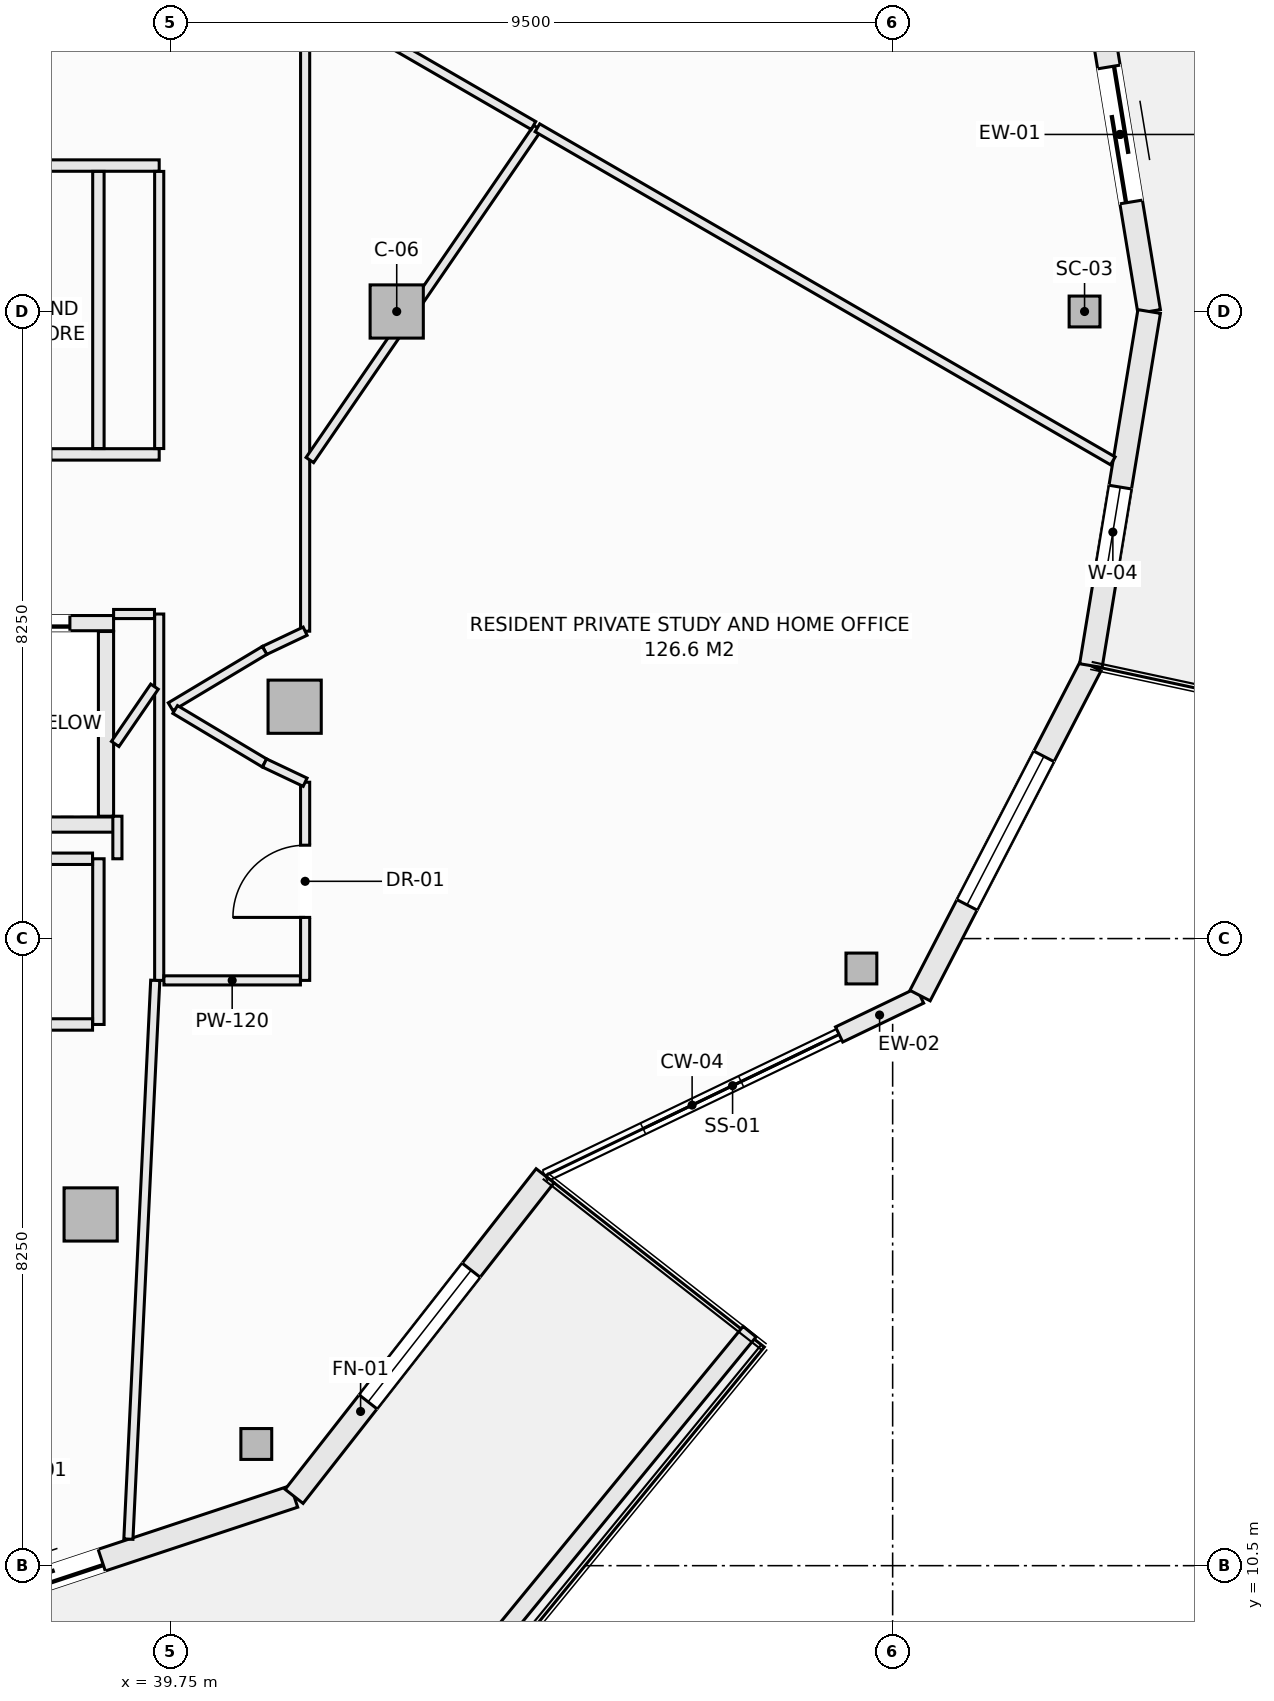
"""IFC4 building model, lengths in metres.
Left out: names, types, materials, properties, quantities, classifications, styles, units other than length and angle.
Written with IfcOpenShell. Run it as: python <this file> out.ifc"""

import sys

from ifc_helpers import new_model, si_unit, direction, frame, frame_2d, origin, origin_2d, place, context, subcontext, project, spatial, rectangle, hollow_rectangle, extrude, element, fill, save


model = new_model("IFC4")
c1 = context("Model", 3, precision=1e-05, world=origin(), true_north=direction((0.0, 1.0)))
c2 = subcontext(c1, "Body", "Model", "MODEL_VIEW")
j1 = project(units=[si_unit("LENGTHUNIT", "METRE"), si_unit("PLANEANGLEUNIT", "RADIAN")], contexts=[c1])
p1 = place(None, origin())
s1 = spatial("IfcSite", under=j1, at=p1, CompositionType="ELEMENT")
p2 = place(p1, origin())
s2 = spatial("IfcBuilding", under=s1, at=p2, CompositionType="ELEMENT")
p3 = place(p2, frame((0.0, 0.0, 239.3)))
s3 = spatial("IfcBuildingStorey", under=s2, at=p3, CompositionType="ELEMENT", Elevation=239.3)
for number, where, z_axis, x_axis in (
    (1, (51.775, 27.0, -0.27), (0.0, 0.0, 1.0), (1.0, 0.0, 0.0)),
    (2, (40.878, 12.101, -0.27), (0.0, 0.0, 1.0), (1.0, 0.0, 0.0)),
    (3, (48.839, 18.356, -0.27), (0.0, 0.0, 1.0), (1.0, 0.0, 0.0)),
):
    element("IfcColumn", number, at=place(p3, frame(where, z_axis=z_axis, x_axis=x_axis)), inside=s3, PredefinedType="COLUMN", context=c2, shape_type="SweptSolid", body=[
        extrude(hollow_rectangle(XDim=0.406, YDim=0.406, WallThickness=0.016, at=origin_2d()), origin(), (0.0, 0.0, 1.0), 3.3),
    ])
for number, where, z_axis, x_axis in (
    (4, (42.725, 27.0, -0.27), (0.0, 0.0, 1.0), (1.0, 0.0, 0.0)),
    (5, (38.698, 15.121, -0.27), (0.0, 0.0, 1.0), (1.0, 0.0, 0.0)),
    (6, (41.382, 21.801, -0.27), (0.0, 0.0, 1.0), (1.0, 0.0, 0.0)),
):
    element("IfcColumn", number, at=place(p3, frame(where, z_axis=z_axis, x_axis=x_axis)), inside=s3, PredefinedType="COLUMN", context=c2, shape_type="SweptSolid", body=[
        extrude(rectangle(XDim=0.7, YDim=0.7, at=origin_2d()), origin(), (0.0, 0.0, 1.0), 3.3),
    ])
p4 = place(p3, frame((51.858, 31.659, 0.0), z_axis=(0.0, 0.0, 1.0), x_axis=(0.162369371657, -0.986730047758, 0.0)))
e7 = element("IfcWall", 7, at=p4, inside=s3, PredefinedType="SOLIDWALL", context=c2, shape_type="SweptSolid", body=[
    extrude(rectangle(XDim=4.721, YDim=0.3, at=frame_2d((2.361, 0.0))), origin(), (0.0, 0.0, 1.0), 2.605),
])
p5 = place(p4, frame((1.461, 0.0, 0.0)))
e8 = element("IfcOpeningElement", 8, at=p5, cuts=e7, PredefinedType="OPENING", context=c2, shape_type="SweptSolid", body=[
    extrude(rectangle(XDim=1.8, YDim=2.25, at=frame_2d((0.9, 1.125))), frame((0.0, 0.16, 0.0), z_axis=(0.0, -1.0, 0.0), x_axis=(1.0, 0.0, 0.0)), (0.0, 0.0, 1.0), 0.32),
])
p6 = place(p3, frame((35.948, 9.613, 0.0), z_axis=(0.0, 0.0, 1.0), x_axis=(0.949232769585, 0.314574552605, 0.0)))
e9 = element("IfcWall", 9, at=p6, inside=s3, PredefinedType="SOLIDWALL", context=c2, shape_type="SweptSolid", body=[
    extrude(rectangle(XDim=5.717, YDim=0.3, at=frame_2d((2.858, 0.0))), origin(), (0.0, 0.0, 1.0), 2.605),
])
p7 = place(p6, frame((1.25, 0.0, 0.0)))
e10 = element("IfcOpeningElement", 10, at=p7, cuts=e9, PredefinedType="OPENING", context=c2, shape_type="SweptSolid", body=[
    extrude(rectangle(XDim=1.8, YDim=2.25, at=frame_2d((0.9, 1.125))), frame((0.0, 0.16, 0.0), z_axis=(0.0, -1.0, 0.0), x_axis=(1.0, 0.0, 0.0)), (0.0, 0.0, 1.0), 0.32),
])
p8 = place(p3, frame((41.375, 11.412, 0.0), z_axis=(0.0, 0.0, 1.0), x_axis=(0.61644588519, 0.787397276241, 0.0)))
e11 = element("IfcWall", 11, at=p8, inside=s3, PredefinedType="SOLIDWALL", context=c2, shape_type="SweptSolid", body=[
    extrude(rectangle(XDim=5.357, YDim=0.3, at=frame_2d((2.678, 0.0))), origin(), (0.0, 0.0, 1.0), 2.605),
])
p9 = place(p8, frame((1.579, 0.0, 0.72)))
e12 = element("IfcOpeningElement", 12, at=p9, cuts=e11, PredefinedType="OPENING", context=c2, shape_type="SweptSolid", body=[
    extrude(rectangle(XDim=2.2, YDim=1.65, at=frame_2d((1.1, 0.825))), frame((0.0, 0.16, 0.0), z_axis=(0.0, -1.0, 0.0), x_axis=(1.0, 0.0, 0.0)), (0.0, 0.0, 1.0), 0.32),
])
p10 = place(p3, frame((48.546, 17.489, 0.0), z_axis=(0.0, 0.0, 1.0), x_axis=(0.901384320487, 0.433019984274, 0.0)))
e13 = element("IfcWall", 13, at=p10, inside=s3, PredefinedType="SOLIDWALL", context=c2, shape_type="SweptSolid", body=[
    extrude(rectangle(XDim=1.181, YDim=0.22, at=frame_2d((0.591, 0.0))), origin(), (0.0, 0.0, 1.0), 2.605),
])
p11 = place(p3, frame((49.611, 18.0, 0.0), z_axis=(0.0, 0.0, 1.0), x_axis=(0.459793771602, 0.888025724625, 0.0)))
e14 = element("IfcWall", 14, at=p11, inside=s3, PredefinedType="SOLIDWALL", context=c2, shape_type="SweptSolid", body=[
    extrude(rectangle(XDim=4.889, YDim=0.3, at=frame_2d((2.444, 0.0))), origin(), (0.0, 0.0, 1.0), 2.605),
])
p12 = place(p11, frame((1.344, 0.0, 0.72)))
e15 = element("IfcOpeningElement", 15, at=p12, cuts=e14, PredefinedType="OPENING", context=c2, shape_type="SweptSolid", body=[
    extrude(rectangle(XDim=2.2, YDim=1.65, at=frame_2d((1.1, 0.825))), frame((0.0, 0.16, 0.0), z_axis=(0.0, -1.0, 0.0), x_axis=(1.0, 0.0, 0.0)), (0.0, 0.0, 1.0), 0.32),
])
p13 = place(p3, frame((51.858, 22.341, 0.0), z_axis=(0.0, 0.0, 1.0), x_axis=(0.162369371657, 0.986730047758, 0.0)))
e16 = element("IfcWall", 16, at=p13, inside=s3, PredefinedType="SOLIDWALL", context=c2, shape_type="SweptSolid", body=[
    extrude(rectangle(XDim=4.721, YDim=0.3, at=frame_2d((2.361, 0.0))), origin(), (0.0, 0.0, 1.0), 2.605),
])
p14 = place(p13, frame((1.18, 0.0, 0.72)))
e17 = element("IfcOpeningElement", 17, at=p14, cuts=e16, PredefinedType="OPENING", context=c2, shape_type="SweptSolid", body=[
    extrude(rectangle(XDim=1.2, YDim=1.65, at=frame_2d((0.6, 0.825))), frame((0.0, 0.16, 0.0), z_axis=(0.0, -1.0, 0.0), x_axis=(1.0, 0.0, 0.0)), (0.0, 0.0, 1.0), 0.32),
])
p15 = place(p3, frame((43.323, 8.646, 0.0), z_axis=(0.0, 0.0, 1.0), x_axis=(0.63407318032, 0.77327304492, 0.0)))
e18 = element("IfcWall", 18, at=p15, inside=s3, PredefinedType="PARAPET", context=c2, shape_type="SweptSolid", body=[
    extrude(rectangle(XDim=6.379, YDim=0.22, at=frame_2d((3.189, 0.0))), origin(), (0.0, 0.0, 1.0), 0.52),
])
p16 = place(p3, frame((36.75, 22.9, 0.0), z_axis=(0.0, 0.0, 1.0), x_axis=(1.0, 0.0, 0.0)))
e19 = element("IfcWall", 19, at=p16, inside=s3, PredefinedType="SOLIDWALL", context=c2, shape_type="SweptSolid", body=[
    extrude(rectangle(XDim=2.25, YDim=0.2, at=frame_2d((1.125, 0.0))), origin(), (0.0, 0.0, 1.0), 3.03),
])
p17 = place(p16, frame((0.575, 0.0, 0.0)))
e20 = element("IfcOpeningElement", 20, at=p17, cuts=e19, PredefinedType="OPENING", context=c2, shape_type="SweptSolid", body=[
    extrude(rectangle(XDim=1.1, YDim=2.2, at=frame_2d((0.55, 1.1))), frame((0.0, 0.11, 0.0), z_axis=(0.0, -1.0, 0.0), x_axis=(1.0, 0.0, 0.0)), (0.0, 0.0, 1.0), 0.22),
])
p18 = place(p3, frame((36.75, 20.25, 0.0), z_axis=(0.0, 0.0, 1.0), x_axis=(1.0, 0.0, 0.0)))
e21 = element("IfcWall", 21, at=p18, inside=s3, PredefinedType="SOLIDWALL", context=c2, shape_type="SweptSolid", body=[
    extrude(rectangle(XDim=2.25, YDim=0.2, at=frame_2d((1.125, 0.0))), origin(), (0.0, 0.0, 1.0), 3.03),
])
p19 = place(p3, frame((38.9, 20.36, 0.0), z_axis=(0.0, 0.0, 1.0), x_axis=(0.0, 1.0, 0.0)))
e22 = element("IfcWall", 22, at=p19, inside=s3, PredefinedType="SOLIDWALL", context=c2, shape_type="SweptSolid", body=[
    extrude(rectangle(XDim=2.43, YDim=0.2, at=frame_2d((1.215, 0.0))), origin(), (0.0, 0.0, 1.0), 3.03),
])
p20 = place(p3, frame((29.96, 25.12, 0.0), z_axis=(0.0, 0.0, 1.0), x_axis=(1.0, 0.0, 0.0)))
e23 = element("IfcWall", 23, at=p20, inside=s3, PredefinedType="PARTITIONING", context=c2, shape_type="SweptSolid", body=[
    extrude(rectangle(XDim=9.64, YDim=0.15, at=frame_2d((4.82, 0.0))), origin(), (0.0, 0.0, 1.0), 3.03),
])
p21 = place(p20, frame((3.05, 0.0, 0.0)))
e24 = element("IfcOpeningElement", 24, at=p21, cuts=e23, PredefinedType="OPENING", context=c2, shape_type="SweptSolid", body=[
    extrude(rectangle(XDim=0.95, YDim=2.1, at=frame_2d((0.475, 1.05))), frame((0.0, 0.085, 0.0), z_axis=(0.0, -1.0, 0.0), x_axis=(1.0, 0.0, 0.0)), (0.0, 0.0, 1.0), 0.17),
])
p22 = place(p20, frame((7.265, 0.0, 0.0)))
e25 = element("IfcOpeningElement", 25, at=p22, cuts=e23, PredefinedType="OPENING", context=c2, shape_type="SweptSolid", body=[
    extrude(rectangle(XDim=0.95, YDim=2.1, at=frame_2d((0.475, 1.05))), frame((0.0, 0.085, 0.0), z_axis=(0.0, -1.0, 0.0), x_axis=(1.0, 0.0, 0.0)), (0.0, 0.0, 1.0), 0.17),
])
p23 = place(p3, frame((30.077, 28.92, 0.0), z_axis=(0.0, 0.0, 1.0), x_axis=(1.0, 0.0, 0.0)))
e26 = element("IfcWall", 26, at=p23, inside=s3, PredefinedType="PARTITIONING", context=c2, shape_type="SweptSolid", body=[
    extrude(rectangle(XDim=9.523, YDim=0.15, at=frame_2d((4.762, 0.0))), origin(), (0.0, 0.0, 1.0), 3.03),
])
p24 = place(p3, frame((38.8, 17.62, 0.0), z_axis=(0.0, 0.0, 1.0), x_axis=(0.0, 1.0, 0.0)))
e27 = element("IfcWall", 27, at=p24, inside=s3, PredefinedType="PARTITIONING", context=c2, shape_type="SweptSolid", body=[
    extrude(rectangle(XDim=2.18, YDim=0.15, at=frame_2d((1.09, 0.0))), origin(), (0.0, 0.0, 1.0), 3.03),
])
p25 = place(p3, frame((38.8, 25.197, 0.0), z_axis=(0.0, 0.0, 1.0), x_axis=(0.0, 1.0, 0.0)))
e28 = element("IfcWall", 28, at=p25, inside=s3, PredefinedType="PARTITIONING", context=c2, shape_type="SweptSolid", body=[
    extrude(rectangle(XDim=3.646, YDim=0.15, at=frame_2d((1.823, 0.0))), origin(), (0.0, 0.0, 1.0), 3.03),
])
p26 = place(p3, frame((34.477, 17.62, 0.0), z_axis=(0.0, 0.0, 1.0), x_axis=(1.0, 0.0, 0.0)))
e29 = element("IfcWall", 29, at=p26, inside=s3, PredefinedType="PARTITIONING", context=c2, shape_type="SweptSolid", body=[
    extrude(rectangle(XDim=4.246, YDim=0.15, at=frame_2d((2.123, 0.0))), origin(), (0.0, 0.0, 1.0), 3.03),
])
p27 = place(p26, frame((0.376, 0.0, 0.0)))
e30 = element("IfcOpeningElement", 30, at=p27, cuts=e29, PredefinedType="OPENING", context=c2, shape_type="SweptSolid", body=[
    extrude(rectangle(XDim=0.95, YDim=2.1, at=frame_2d((0.475, 1.05))), frame((0.0, 0.085, 0.0), z_axis=(0.0, -1.0, 0.0), x_axis=(1.0, 0.0, 0.0)), (0.0, 0.0, 1.0), 0.17),
])
p28 = place(p3, frame((34.477, 19.8, 0.0), z_axis=(0.0, 0.0, 1.0), x_axis=(1.0, 0.0, 0.0)))
e31 = element("IfcWall", 31, at=p28, inside=s3, PredefinedType="PARTITIONING", context=c2, shape_type="SweptSolid", body=[
    extrude(rectangle(XDim=4.246, YDim=0.15, at=frame_2d((2.123, 0.0))), origin(), (0.0, 0.0, 1.0), 3.03),
])
p29 = place(p3, frame((39.05, 19.8, 0.0), z_axis=(0.0, 0.0, 1.0), x_axis=(0.0, 1.0, 0.0)))
e32 = element("IfcWall", 32, at=p29, inside=s3, PredefinedType="PARTITIONING", context=c2, shape_type="SweptSolid", body=[
    extrude(rectangle(XDim=0.56, YDim=0.12, at=frame_2d((0.28, 0.0))), origin(), (0.0, 0.0, 1.0), 3.03),
])
p30 = place(p3, frame((39.6, 18.2, 0.0), z_axis=(0.0, 0.0, 1.0), x_axis=(0.0, 1.0, 0.0)))
e33 = element("IfcWall", 33, at=p30, inside=s3, PredefinedType="PARTITIONING", context=c2, shape_type="SweptSolid", body=[
    extrude(rectangle(XDim=4.82, YDim=0.12, at=frame_2d((2.41, 0.0))), origin(), (0.0, 0.0, 1.0), 3.03),
])
p31 = place(p3, frame((39.6, 25.197, 0.0), z_axis=(0.0, 0.0, 1.0), x_axis=(0.0, 1.0, 0.0)))
e34 = element("IfcWall", 34, at=p31, inside=s3, PredefinedType="PARTITIONING", context=c2, shape_type="SweptSolid", body=[
    extrude(rectangle(XDim=3.646, YDim=0.12, at=frame_2d((1.823, 0.0))), origin(), (0.0, 0.0, 1.0), 3.03),
])
p32 = place(p3, frame((41.52, 18.2, 0.0), z_axis=(0.0, 0.0, 1.0), x_axis=(0.0, 1.0, 0.0)))
e35 = element("IfcWall", 35, at=p32, inside=s3, PredefinedType="PARTITIONING", context=c2, shape_type="SweptSolid", body=[
    extrude(rectangle(XDim=2.607, YDim=0.12, at=frame_2d((1.303, 0.0))), origin(), (0.0, 0.0, 1.0), 3.03),
])
p33 = place(p32, frame((0.829, 0.0, 0.0)))
e36 = element("IfcOpeningElement", 36, at=p33, cuts=e35, PredefinedType="OPENING", context=c2, shape_type="SweptSolid", body=[
    extrude(rectangle(XDim=0.95, YDim=2.1, at=frame_2d((0.475, 1.05))), frame((0.0, 0.07, 0.0), z_axis=(0.0, -1.0, 0.0), x_axis=(1.0, 0.0, 0.0)), (0.0, 0.0, 1.0), 0.14),
])
p34 = place(p3, frame((41.52, 22.794, 0.0), z_axis=(0.0, 0.0, 1.0), x_axis=(0.0, 1.0, 0.0)))
e37 = element("IfcWall", 37, at=p34, inside=s3, PredefinedType="PARTITIONING", context=c2, shape_type="SweptSolid", body=[
    extrude(rectangle(XDim=8.412, YDim=0.12, at=frame_2d((4.206, 0.0))), origin(), (0.0, 0.0, 1.0), 2.478),
])
p35 = place(p3, frame((40.986, 22.541, 0.0), z_axis=(0.0, 0.0, 1.0), x_axis=(0.903729424576, 0.428104107847, 0.0)))
e38 = element("IfcWall", 38, at=p35, inside=s3, PredefinedType="PARTITIONING", context=c2, shape_type="SweptSolid", body=[
    extrude(rectangle(XDim=0.591, YDim=0.12, at=frame_2d((0.295, 0.0))), origin(), (0.0, 0.0, 1.0), 3.03),
])
p36 = place(p3, frame((39.75, 21.8, 0.0), z_axis=(0.0, 0.0, 1.0), x_axis=(0.857702120906, 0.514146935996, 0.0)))
e39 = element("IfcWall", 39, at=p36, inside=s3, PredefinedType="PARTITIONING", context=c2, shape_type="SweptSolid", body=[
    extrude(rectangle(XDim=1.441, YDim=0.12, at=frame_2d((0.721, 0.0))), origin(), (0.0, 0.0, 1.0), 3.03),
])
p37 = place(p3, frame((39.81, 21.764, 0.0), z_axis=(0.0, 0.0, 1.0), x_axis=(0.858011245414, -0.513630901273, 0.0)))
e40 = element("IfcWall", 40, at=p37, inside=s3, PredefinedType="PARTITIONING", context=c2, shape_type="SweptSolid", body=[
    extrude(rectangle(XDim=1.37, YDim=0.12, at=frame_2d((0.685, 0.0))), origin(), (0.0, 0.0, 1.0), 3.03),
])
p38 = place(p3, frame((40.986, 21.06, 0.0), z_axis=(0.0, 0.0, 1.0), x_axis=(0.90356951601, -0.428441512621, 0.0)))
e41 = element("IfcWall", 41, at=p38, inside=s3, PredefinedType="PARTITIONING", context=c2, shape_type="SweptSolid", body=[
    extrude(rectangle(XDim=0.591, YDim=0.12, at=frame_2d((0.295, 0.0))), origin(), (0.0, 0.0, 1.0), 3.03),
])
p39 = place(p3, frame((39.662, 18.2, 0.0), z_axis=(0.0, 0.0, 1.0), x_axis=(1.0, 0.0, 0.0)))
e42 = element("IfcWall", 42, at=p39, inside=s3, PredefinedType="PARTITIONING", context=c2, shape_type="SweptSolid", body=[
    extrude(rectangle(XDim=1.796, YDim=0.12, at=frame_2d((0.898, 0.0))), origin(), (0.0, 0.0, 1.0), 2.77),
])
p40 = place(p3, frame((39.0, 23.02, 0.0), z_axis=(0.0, 0.0, 1.0), x_axis=(1.0, 0.0, 0.0)))
e43 = element("IfcWall", 43, at=p40, inside=s3, PredefinedType="PARTITIONING", context=c2, shape_type="SweptSolid", body=[
    extrude(rectangle(XDim=0.538, YDim=0.12, at=frame_2d((0.269, 0.0))), origin(), (0.0, 0.0, 1.0), 3.03),
])
p41 = place(p3, frame((39.021, 21.31, 0.0), z_axis=(0.0, 0.0, 1.0), x_axis=(0.565621769156, 0.824664789024, 0.0)))
e44 = element("IfcWall", 44, at=p41, inside=s3, PredefinedType="PARTITIONING", context=c2, shape_type="SweptSolid", body=[
    extrude(rectangle(XDim=0.914, YDim=0.12, at=frame_2d((0.457, 0.0))), origin(), (0.0, 0.0, 1.0), 3.03),
])
p42 = place(p3, frame((41.582, 25.046, 0.0), z_axis=(0.0, 0.0, 1.0), x_axis=(0.565425372418, 0.824799459399, 0.0)))
e45 = element("IfcWall", 45, at=p42, inside=s3, PredefinedType="PARTITIONING", context=c2, shape_type="SweptSolid", body=[
    extrude(rectangle(XDim=5.298, YDim=0.12, at=frame_2d((2.649, 0.0))), origin(), (0.0, 0.0, 1.0), 2.478),
])
p43 = place(p3, frame((39.195, 10.849, 0.0), z_axis=(0.0, 0.0, 1.0), x_axis=(0.048036414601, 0.998845585099, 0.0)))
e46 = element("IfcWall", 46, at=p43, inside=s3, PredefinedType="PARTITIONING", context=c2, shape_type="SweptSolid", body=[
    extrude(rectangle(XDim=7.359, YDim=0.12, at=frame_2d((3.68, 0.0))), origin(), (0.0, 0.0, 1.0), 2.478),
])
p44 = place(p3, frame((41.582, 31.15, 0.0), z_axis=(0.0, 0.0, 1.0), x_axis=(0.865485283928, -0.500934350294, 0.0)))
e47 = element("IfcWall", 47, at=p44, inside=s3, PredefinedType="PARTITIONING", context=c2, shape_type="SweptSolid", body=[
    extrude(rectangle(XDim=3.399, YDim=0.12, at=frame_2d((1.7, 0.0))), origin(), (0.0, 0.0, 1.0), 3.03),
])
p45 = place(p3, frame((44.576, 29.417, 0.0), z_axis=(0.0, 0.0, 1.0), x_axis=(0.865466406929, -0.500966963459, 0.0)))
e48 = element("IfcWall", 48, at=p45, inside=s3, PredefinedType="PARTITIONING", context=c2, shape_type="SweptSolid", body=[
    extrude(rectangle(XDim=8.748, YDim=0.12, at=frame_2d((4.374, 0.0))), origin(), (0.0, 0.0, 1.0), 2.478),
])
p46 = place(p5, origin())
e49 = element("IfcDoor", 49, at=p46, inside=s3, OperationType="SLIDING_TO_LEFT", PredefinedType="DOOR", context=c2, shape_type="SweptSolid", body=[
    extrude(rectangle(XDim=1.8, YDim=2.25, at=frame_2d((0.9, 1.125))), frame((0.0, 0.025, 0.0), z_axis=(0.0, -1.0, 0.0), x_axis=(1.0, 0.0, 0.0)), (0.0, 0.0, 1.0), 0.05),
])
fill(e8, e49)
p47 = place(p7, frame((1.8, 0.0, 0.0), z_axis=(0.0, 0.0, 1.0), x_axis=(-1.0, 0.0, 0.0)))
e50 = element("IfcDoor", 50, at=p47, inside=s3, OperationType="SLIDING_TO_LEFT", PredefinedType="DOOR", context=c2, shape_type="SweptSolid", body=[
    extrude(rectangle(XDim=1.8, YDim=2.25, at=frame_2d((0.9, 1.125))), frame((0.0, 0.025, 0.0), z_axis=(0.0, -1.0, 0.0), x_axis=(1.0, 0.0, 0.0)), (0.0, 0.0, 1.0), 0.05),
])
fill(e10, e50)
p48 = place(p9, origin())
e51 = element("IfcWindow", 51, at=p48, inside=s3, PartitioningType="SINGLE_PANEL", PredefinedType="WINDOW", context=c2, shape_type="SweptSolid", body=[
    extrude(rectangle(XDim=2.2, YDim=1.65, at=frame_2d((1.1, 0.825))), frame((0.0, 0.03, 0.0), z_axis=(0.0, -1.0, 0.0), x_axis=(1.0, 0.0, 0.0)), (0.0, 0.0, 1.0), 0.06),
])
fill(e12, e51)
p49 = place(p12, origin())
e52 = element("IfcWindow", 52, at=p49, inside=s3, PartitioningType="SINGLE_PANEL", PredefinedType="WINDOW", context=c2, shape_type="SweptSolid", body=[
    extrude(rectangle(XDim=2.2, YDim=1.65, at=frame_2d((1.1, 0.825))), frame((0.0, 0.03, 0.0), z_axis=(0.0, -1.0, 0.0), x_axis=(1.0, 0.0, 0.0)), (0.0, 0.0, 1.0), 0.06),
])
fill(e15, e52)
p50 = place(p14, origin())
e53 = element("IfcWindow", 53, at=p50, inside=s3, PartitioningType="SINGLE_PANEL", PredefinedType="WINDOW", context=c2, shape_type="SweptSolid", body=[
    extrude(rectangle(XDim=1.2, YDim=1.65, at=frame_2d((0.6, 0.825))), frame((0.0, 0.03, 0.0), z_axis=(0.0, -1.0, 0.0), x_axis=(1.0, 0.0, 0.0)), (0.0, 0.0, 1.0), 0.06),
])
fill(e17, e53)
p51 = place(p17, origin())
e54 = element("IfcDoor", 54, at=p51, inside=s3, OperationType="SLIDING_TO_LEFT", PredefinedType="DOOR", context=c2, shape_type="SweptSolid", body=[
    extrude(rectangle(XDim=1.1, YDim=2.2, at=frame_2d((0.55, 1.1))), frame((0.0, 0.025, 0.0), z_axis=(0.0, -1.0, 0.0), x_axis=(1.0, 0.0, 0.0)), (0.0, 0.0, 1.0), 0.05),
])
fill(e20, e54)
p52 = place(p33, origin())
e55 = element("IfcDoor", 55, at=p52, inside=s3, OperationType="SINGLE_SWING_LEFT", PredefinedType="DOOR", context=c2, shape_type="SweptSolid", body=[
    extrude(rectangle(XDim=0.95, YDim=2.1, at=frame_2d((0.475, 1.05))), frame((0.0, 0.025, 0.0), z_axis=(0.0, -1.0, 0.0), x_axis=(1.0, 0.0, 0.0)), (0.0, 0.0, 1.0), 0.05),
])
fill(e36, e55)
save(model, sys.argv[1])
